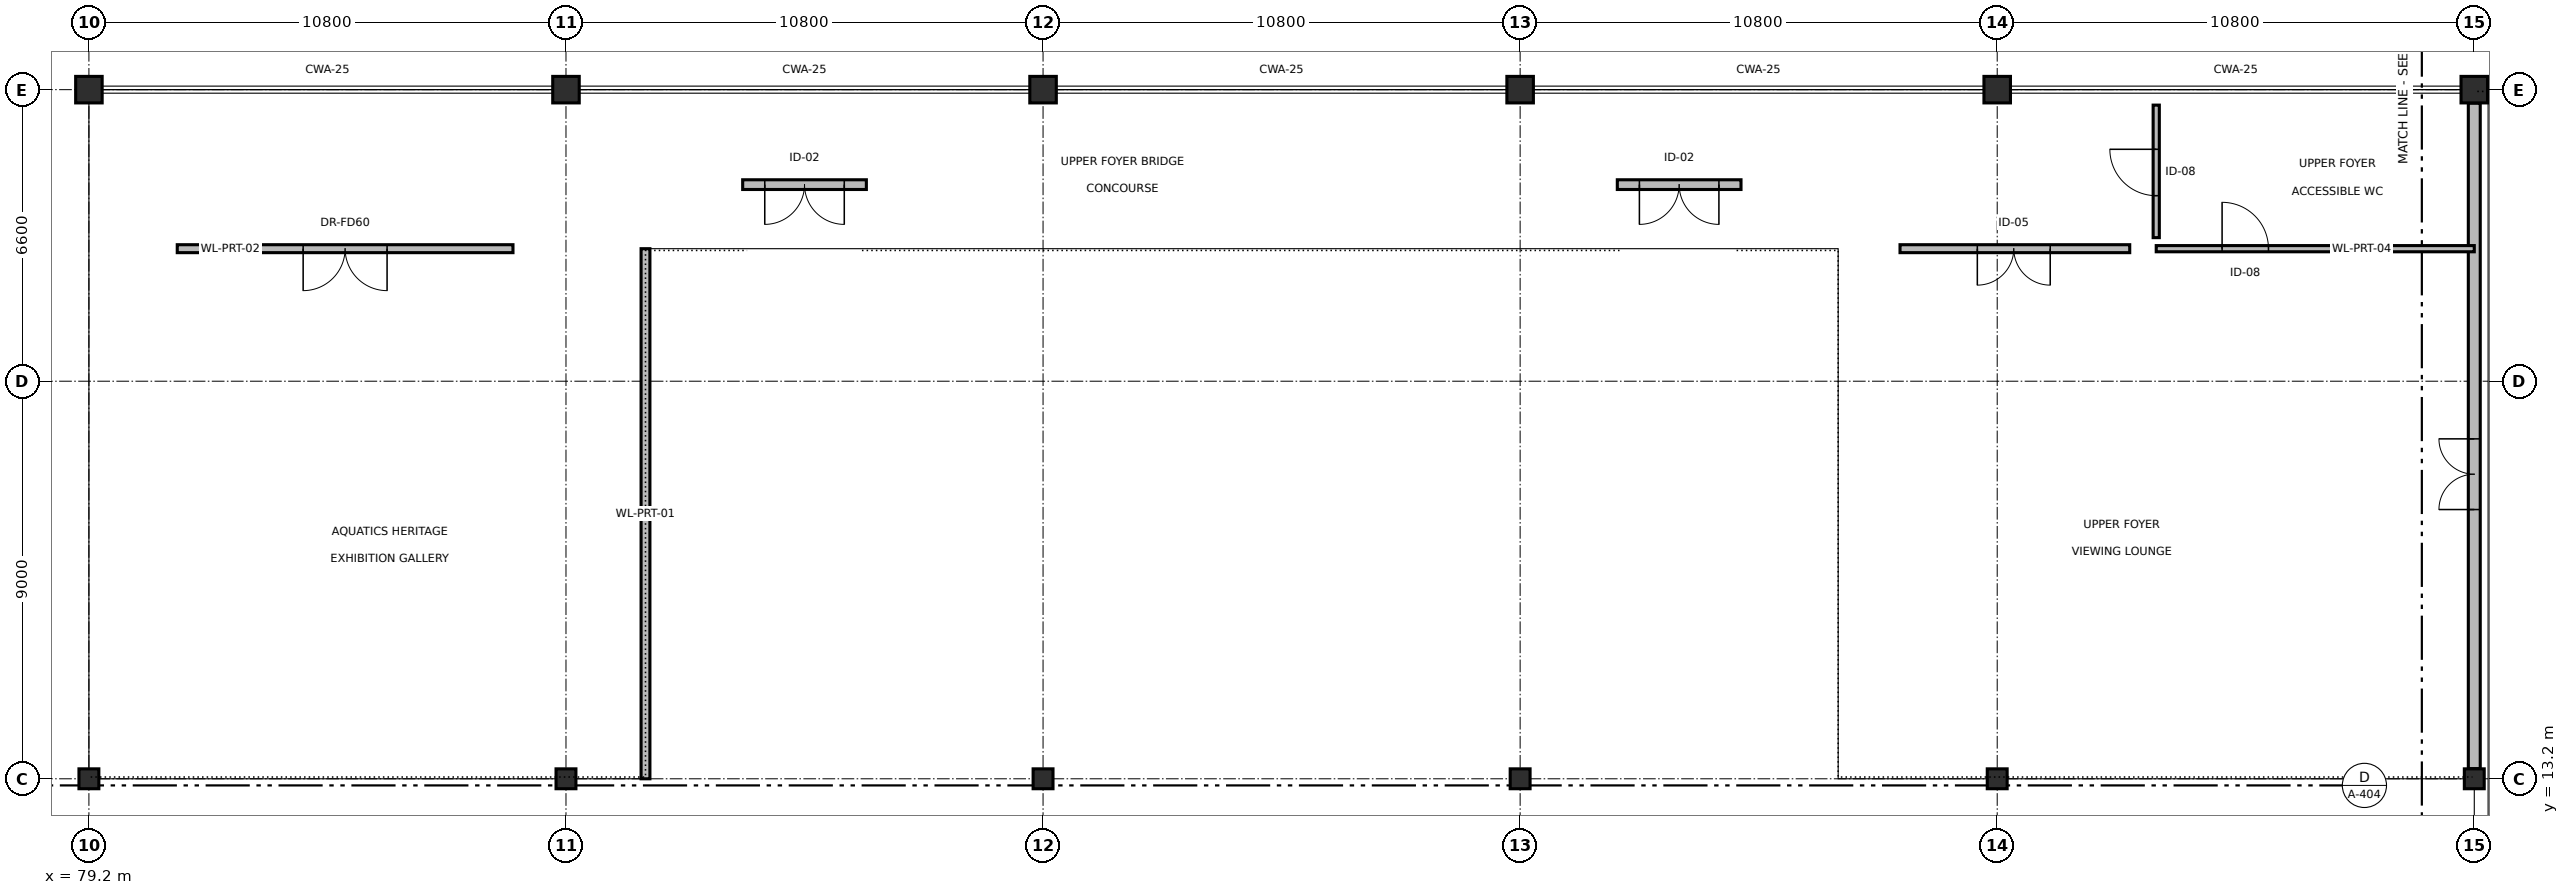
"""IFC4 building model, lengths in metres.
Left out: names, types, materials, properties, quantities, classifications, styles, units other than length and angle.
Written with IfcOpenShell. Run it as: python <this file> out.ifc"""

import sys

from ifc_helpers import new_model, si_unit, direction, frame, frame_2d, origin, origin_2d, place, context, subcontext, project, spatial, rectangle, circle, extrude, element, fill, save


model = new_model("IFC4")
c1 = context("Model", 3, precision=1e-05, world=origin(), true_north=direction((0.0, 1.0)))
c2 = subcontext(c1, "Body", "Model", "MODEL_VIEW")
j1 = project(units=[si_unit("LENGTHUNIT", "METRE"), si_unit("PLANEANGLEUNIT", "RADIAN")], contexts=[c1])
p1 = place(None, origin())
s1 = spatial("IfcSite", under=j1, at=p1, CompositionType="ELEMENT")
p2 = place(p1, origin())
s2 = spatial("IfcBuilding", under=s1, at=p2, CompositionType="ELEMENT")
p3 = place(p2, frame((0.0, 0.0, 4.8)))
s3 = spatial("IfcBuildingStorey", under=s2, at=p3, CompositionType="ELEMENT", Elevation=4.8)
p4 = place(p3, frame((79.2, 13.2, 0.0), z_axis=(0.0, 0.0, 1.0), x_axis=(1.0, 0.0, 0.0)))
e1 = element("IfcColumn", 1, at=p4, inside=s3, PredefinedType="COLUMN", context=c2, shape_type="SweptSolid", body=[
    extrude(rectangle(XDim=0.45, YDim=0.45, at=origin_2d()), origin(), (0.0, 0.0, 1.0), 4.8),
])
p5 = place(p3, frame((79.2, 28.8, 0.0), z_axis=(0.0, 0.0, 1.0), x_axis=(1.0, 0.0, 0.0)))
e2 = element("IfcColumn", 2, at=p5, inside=s3, PredefinedType="COLUMN", context=c2, shape_type="SweptSolid", body=[
    extrude(circle(Radius=0.3, at=origin_2d()), origin(), (0.0, 0.0, 1.0), 3.025),
])
p6 = place(p3, frame((90.0, 13.2, 0.0), z_axis=(0.0, 0.0, 1.0), x_axis=(1.0, 0.0, 0.0)))
e3 = element("IfcColumn", 3, at=p6, inside=s3, PredefinedType="COLUMN", context=c2, shape_type="SweptSolid", body=[
    extrude(rectangle(XDim=0.45, YDim=0.45, at=origin_2d()), origin(), (0.0, 0.0, 1.0), 4.8),
])
p7 = place(p3, frame((90.0, 28.8, 0.0), z_axis=(0.0, 0.0, 1.0), x_axis=(1.0, 0.0, 0.0)))
e4 = element("IfcColumn", 4, at=p7, inside=s3, PredefinedType="COLUMN", context=c2, shape_type="SweptSolid", body=[
    extrude(circle(Radius=0.3, at=origin_2d()), origin(), (0.0, 0.0, 1.0), 2.835),
])
p8 = place(p3, frame((100.8, 13.2, 0.0), z_axis=(0.0, 0.0, 1.0), x_axis=(1.0, 0.0, 0.0)))
e5 = element("IfcColumn", 5, at=p8, inside=s3, PredefinedType="COLUMN", context=c2, shape_type="SweptSolid", body=[
    extrude(rectangle(XDim=0.45, YDim=0.45, at=origin_2d()), origin(), (0.0, 0.0, 1.0), 4.8),
])
p9 = place(p3, frame((100.8, 28.8, 0.0), z_axis=(0.0, 0.0, 1.0), x_axis=(1.0, 0.0, 0.0)))
e6 = element("IfcColumn", 6, at=p9, inside=s3, PredefinedType="COLUMN", context=c2, shape_type="SweptSolid", body=[
    extrude(circle(Radius=0.3, at=origin_2d()), origin(), (0.0, 0.0, 1.0), 2.475),
])
p10 = place(p3, frame((111.6, 13.2, 0.0), z_axis=(0.0, 0.0, 1.0), x_axis=(1.0, 0.0, 0.0)))
e7 = element("IfcColumn", 7, at=p10, inside=s3, PredefinedType="COLUMN", context=c2, shape_type="SweptSolid", body=[
    extrude(rectangle(XDim=0.45, YDim=0.45, at=origin_2d()), origin(), (0.0, 0.0, 1.0), 4.8),
])
p11 = place(p3, frame((111.6, 28.8, 0.0), z_axis=(0.0, 0.0, 1.0), x_axis=(1.0, 0.0, 0.0)))
e8 = element("IfcColumn", 8, at=p11, inside=s3, PredefinedType="COLUMN", context=c2, shape_type="SweptSolid", body=[
    extrude(circle(Radius=0.3, at=origin_2d()), origin(), (0.0, 0.0, 1.0), 2.075),
])
p12 = place(p3, frame((122.4, 13.2, 0.0), z_axis=(0.0, 0.0, 1.0), x_axis=(1.0, 0.0, 0.0)))
e9 = element("IfcColumn", 9, at=p12, inside=s3, PredefinedType="COLUMN", context=c2, shape_type="SweptSolid", body=[
    extrude(rectangle(XDim=0.45, YDim=0.45, at=origin_2d()), origin(), (0.0, 0.0, 1.0), 4.8),
])
p13 = place(p3, frame((122.4, 28.8, 0.0), z_axis=(0.0, 0.0, 1.0), x_axis=(1.0, 0.0, 0.0)))
e10 = element("IfcColumn", 10, at=p13, inside=s3, PredefinedType="COLUMN", context=c2, shape_type="SweptSolid", body=[
    extrude(circle(Radius=0.3, at=origin_2d()), origin(), (0.0, 0.0, 1.0), 2.475),
])
p14 = place(p3, frame((133.2, 13.2, 0.0), z_axis=(0.0, 0.0, 1.0), x_axis=(1.0, 0.0, 0.0)))
e11 = element("IfcColumn", 11, at=p14, inside=s3, PredefinedType="COLUMN", context=c2, shape_type="SweptSolid", body=[
    extrude(rectangle(XDim=0.45, YDim=0.45, at=origin_2d()), origin(), (0.0, 0.0, 1.0), 4.8),
])
p15 = place(p3, frame((133.2, 28.8, 0.0), z_axis=(0.0, 0.0, 1.0), x_axis=(1.0, 0.0, 0.0)))
e12 = element("IfcColumn", 12, at=p15, inside=s3, PredefinedType="COLUMN", context=c2, shape_type="SweptSolid", body=[
    extrude(circle(Radius=0.3, at=origin_2d()), origin(), (0.0, 0.0, 1.0), 2.835),
])
p16 = place(p3, frame((133.2, 28.495, 0.0), z_axis=(0.0, 0.0, 1.0), x_axis=(0.0, -1.0, 0.0)))
e13 = element("IfcWall", 13, at=p16, inside=s3, PredefinedType="SOLIDWALL", context=c2, shape_type="SweptSolid", body=[
    extrude(rectangle(XDim=15.065, YDim=0.27, at=frame_2d((7.533, 0.0))), origin(), (0.0, 0.0, 1.0), 2.81),
])
p17 = place(p16, frame((7.6, 0.0, 0.0)))
e14 = element("IfcOpeningElement", 14, at=p17, cuts=e13, PredefinedType="OPENING", context=c2, shape_type="SweptSolid", body=[
    extrude(rectangle(XDim=1.6, YDim=2.2, at=frame_2d((0.8, 1.1))), frame((0.0, 0.145, 0.0), z_axis=(0.0, -1.0, 0.0), x_axis=(1.0, 0.0, 0.0)), (0.0, 0.0, 1.0), 0.29),
])
p18 = place(p3, frame((81.2, 25.2, 0.0), z_axis=(0.0, 0.0, 1.0), x_axis=(1.0, 0.0, 0.0)))
e15 = element("IfcWall", 15, at=p18, inside=s3, PredefinedType="PARTITIONING", context=c2, shape_type="SweptSolid", body=[
    extrude(rectangle(XDim=7.6, YDim=0.18, at=frame_2d((3.8, 0.0))), origin(), (0.0, 0.0, 1.0), 4.285),
])
p19 = place(p18, frame((2.85, 0.0, 0.0)))
e16 = element("IfcOpeningElement", 16, at=p19, cuts=e15, PredefinedType="OPENING", context=c2, shape_type="SweptSolid", body=[
    extrude(rectangle(XDim=1.9, YDim=2.2, at=frame_2d((0.95, 1.1))), frame((0.0, 0.1, 0.0), z_axis=(0.0, -1.0, 0.0), x_axis=(1.0, 0.0, 0.0)), (0.0, 0.0, 1.0), 0.2),
])
p20 = place(p3, frame((120.2, 25.2, 0.0), z_axis=(0.0, 0.0, 1.0), x_axis=(1.0, 0.0, 0.0)))
e17 = element("IfcWall", 17, at=p20, inside=s3, PredefinedType="PARTITIONING", context=c2, shape_type="SweptSolid", body=[
    extrude(rectangle(XDim=5.2, YDim=0.18, at=frame_2d((2.6, 0.0))), origin(), (0.0, 0.0, 1.0), 2.81),
])
p21 = place(p20, frame((1.75, 0.0, 0.0)))
e18 = element("IfcOpeningElement", 18, at=p21, cuts=e17, PredefinedType="OPENING", context=c2, shape_type="SweptSolid", body=[
    extrude(rectangle(XDim=1.65, YDim=2.2, at=frame_2d((0.825, 1.1))), frame((0.0, 0.1, 0.0), z_axis=(0.0, -1.0, 0.0), x_axis=(1.0, 0.0, 0.0)), (0.0, 0.0, 1.0), 0.2),
])
p22 = place(p3, frame((126.0, 25.45, 0.0), z_axis=(0.0, 0.0, 1.0), x_axis=(0.0, 1.0, 0.0)))
e19 = element("IfcWall", 19, at=p22, inside=s3, PredefinedType="PARTITIONING", context=c2, shape_type="SweptSolid", body=[
    extrude(rectangle(XDim=3.0, YDim=0.14, at=frame_2d((1.5, 0.0))), origin(), (0.0, 0.0, 1.0), 4.285),
])
p23 = place(p22, frame((0.95, 0.0, 0.0)))
e20 = element("IfcOpeningElement", 20, at=p23, cuts=e19, PredefinedType="OPENING", context=c2, shape_type="SweptSolid", body=[
    extrude(rectangle(XDim=1.05, YDim=2.2, at=frame_2d((0.525, 1.1))), frame((0.0, 0.08, 0.0), z_axis=(0.0, -1.0, 0.0), x_axis=(1.0, 0.0, 0.0)), (0.0, 0.0, 1.0), 0.16),
])
p24 = place(p3, frame((91.8, 13.2, 0.0), z_axis=(0.0, 0.0, 1.0), x_axis=(0.0, 1.0, 0.0)))
e21 = element("IfcWall", 21, at=p24, inside=s3, PredefinedType="PARTITIONING", context=c2, shape_type="SweptSolid", body=[
    extrude(rectangle(XDim=12.0, YDim=0.2, at=frame_2d((6.0, 0.0))), origin(), (0.0, 0.0, 1.0), 2.955),
])
p25 = place(p3, frame((126.0, 25.2, 0.0), z_axis=(0.0, 0.0, 1.0), x_axis=(1.0, 0.0, 0.0)))
e22 = element("IfcWall", 22, at=p25, inside=s3, PredefinedType="PARTITIONING", context=c2, shape_type="SweptSolid", body=[
    extrude(rectangle(XDim=7.2, YDim=0.14, at=frame_2d((3.6, 0.0))), origin(), (0.0, 0.0, 1.0), 2.824),
])
p26 = place(p25, frame((1.491, 0.0, 0.0)))
e23 = element("IfcOpeningElement", 23, at=p26, cuts=e22, PredefinedType="OPENING", context=c2, shape_type="SweptSolid", body=[
    extrude(rectangle(XDim=1.05, YDim=2.2, at=frame_2d((0.525, 1.1))), frame((0.0, 0.08, 0.0), z_axis=(0.0, -1.0, 0.0), x_axis=(1.0, 0.0, 0.0)), (0.0, 0.0, 1.0), 0.16),
])
p27 = place(p3, frame((94.0, 26.65, 0.0), z_axis=(0.0, 0.0, 1.0), x_axis=(1.0, 0.0, 0.0)))
e24 = element("IfcWall", 24, at=p27, inside=s3, PredefinedType="PARTITIONING", context=c2, shape_type="SweptSolid", body=[
    extrude(rectangle(XDim=2.8, YDim=0.22, at=frame_2d((1.4, 0.0))), origin(), (0.0, 0.0, 1.0), 2.935),
])
p28 = place(p27, frame((0.5, 0.0, 0.0)))
e25 = element("IfcOpeningElement", 25, at=p28, cuts=e24, PredefinedType="OPENING", context=c2, shape_type="SweptSolid", body=[
    extrude(rectangle(XDim=1.8, YDim=2.2, at=frame_2d((0.9, 1.1))), frame((0.0, 0.12, 0.0), z_axis=(0.0, -1.0, 0.0), x_axis=(1.0, 0.0, 0.0)), (0.0, 0.0, 1.0), 0.24),
])
p29 = place(p3, frame((113.8, 26.65, 0.0), z_axis=(0.0, 0.0, 1.0), x_axis=(1.0, 0.0, 0.0)))
e26 = element("IfcWall", 26, at=p29, inside=s3, PredefinedType="PARTITIONING", context=c2, shape_type="SweptSolid", body=[
    extrude(rectangle(XDim=2.8, YDim=0.22, at=frame_2d((1.4, 0.0))), origin(), (0.0, 0.0, 1.0), 2.935),
])
p30 = place(p29, frame((0.5, 0.0, 0.0)))
e27 = element("IfcOpeningElement", 27, at=p30, cuts=e26, PredefinedType="OPENING", context=c2, shape_type="SweptSolid", body=[
    extrude(rectangle(XDim=1.8, YDim=2.2, at=frame_2d((0.9, 1.1))), frame((0.0, 0.12, 0.0), z_axis=(0.0, -1.0, 0.0), x_axis=(1.0, 0.0, 0.0)), (0.0, 0.0, 1.0), 0.24),
])
p31 = place(p17, origin())
e28 = element("IfcDoor", 28, at=p31, inside=s3, OperationType="DOUBLE_DOOR_SINGLE_SWING", PredefinedType="DOOR", context=c2, shape_type="SweptSolid", body=[
    extrude(rectangle(XDim=1.6, YDim=2.2, at=frame_2d((0.8, 1.1))), frame((0.0, 0.025, 0.0), z_axis=(0.0, -1.0, 0.0), x_axis=(1.0, 0.0, 0.0)), (0.0, 0.0, 1.0), 0.05),
])
fill(e14, e28)
p32 = place(p19, origin())
e29 = element("IfcDoor", 29, at=p32, inside=s3, OperationType="DOUBLE_DOOR_SINGLE_SWING", PredefinedType="DOOR", context=c2, shape_type="SweptSolid", body=[
    extrude(rectangle(XDim=1.9, YDim=2.2, at=frame_2d((0.95, 1.1))), frame((0.0, 0.025, 0.0), z_axis=(0.0, -1.0, 0.0), x_axis=(1.0, 0.0, 0.0)), (0.0, 0.0, 1.0), 0.05),
])
fill(e16, e29)
p33 = place(p21, origin())
e30 = element("IfcDoor", 30, at=p33, inside=s3, OperationType="DOUBLE_DOOR_SINGLE_SWING", PredefinedType="DOOR", context=c2, shape_type="SweptSolid", body=[
    extrude(rectangle(XDim=1.65, YDim=2.2, at=frame_2d((0.825, 1.1))), frame((0.0, 0.025, 0.0), z_axis=(0.0, -1.0, 0.0), x_axis=(1.0, 0.0, 0.0)), (0.0, 0.0, 1.0), 0.05),
])
fill(e18, e30)
p34 = place(p23, origin())
e31 = element("IfcDoor", 31, at=p34, inside=s3, OperationType="SINGLE_SWING_RIGHT", PredefinedType="DOOR", context=c2, shape_type="SweptSolid", body=[
    extrude(rectangle(XDim=1.05, YDim=2.2, at=frame_2d((0.525, 1.1))), frame((0.0, 0.025, 0.0), z_axis=(0.0, -1.0, 0.0), x_axis=(1.0, 0.0, 0.0)), (0.0, 0.0, 1.0), 0.05),
])
fill(e20, e31)
p35 = place(p26, origin())
e32 = element("IfcDoor", 32, at=p35, inside=s3, OperationType="SINGLE_SWING_LEFT", PredefinedType="DOOR", context=c2, shape_type="SweptSolid", body=[
    extrude(rectangle(XDim=1.05, YDim=2.2, at=frame_2d((0.525, 1.1))), frame((0.0, 0.025, 0.0), z_axis=(0.0, -1.0, 0.0), x_axis=(1.0, 0.0, 0.0)), (0.0, 0.0, 1.0), 0.05),
])
fill(e23, e32)
p36 = place(p28, origin())
e33 = element("IfcDoor", 33, at=p36, inside=s3, OperationType="DOUBLE_DOOR_SINGLE_SWING", PredefinedType="DOOR", context=c2, shape_type="SweptSolid", body=[
    extrude(rectangle(XDim=1.8, YDim=2.2, at=frame_2d((0.9, 1.1))), frame((0.0, 0.025, 0.0), z_axis=(0.0, -1.0, 0.0), x_axis=(1.0, 0.0, 0.0)), (0.0, 0.0, 1.0), 0.05),
])
fill(e25, e33)
p37 = place(p30, origin())
e34 = element("IfcDoor", 34, at=p37, inside=s3, OperationType="DOUBLE_DOOR_SINGLE_SWING", PredefinedType="DOOR", context=c2, shape_type="SweptSolid", body=[
    extrude(rectangle(XDim=1.8, YDim=2.2, at=frame_2d((0.9, 1.1))), frame((0.0, 0.025, 0.0), z_axis=(0.0, -1.0, 0.0), x_axis=(1.0, 0.0, 0.0)), (0.0, 0.0, 1.0), 0.05),
])
fill(e27, e34)
save(model, sys.argv[1])
